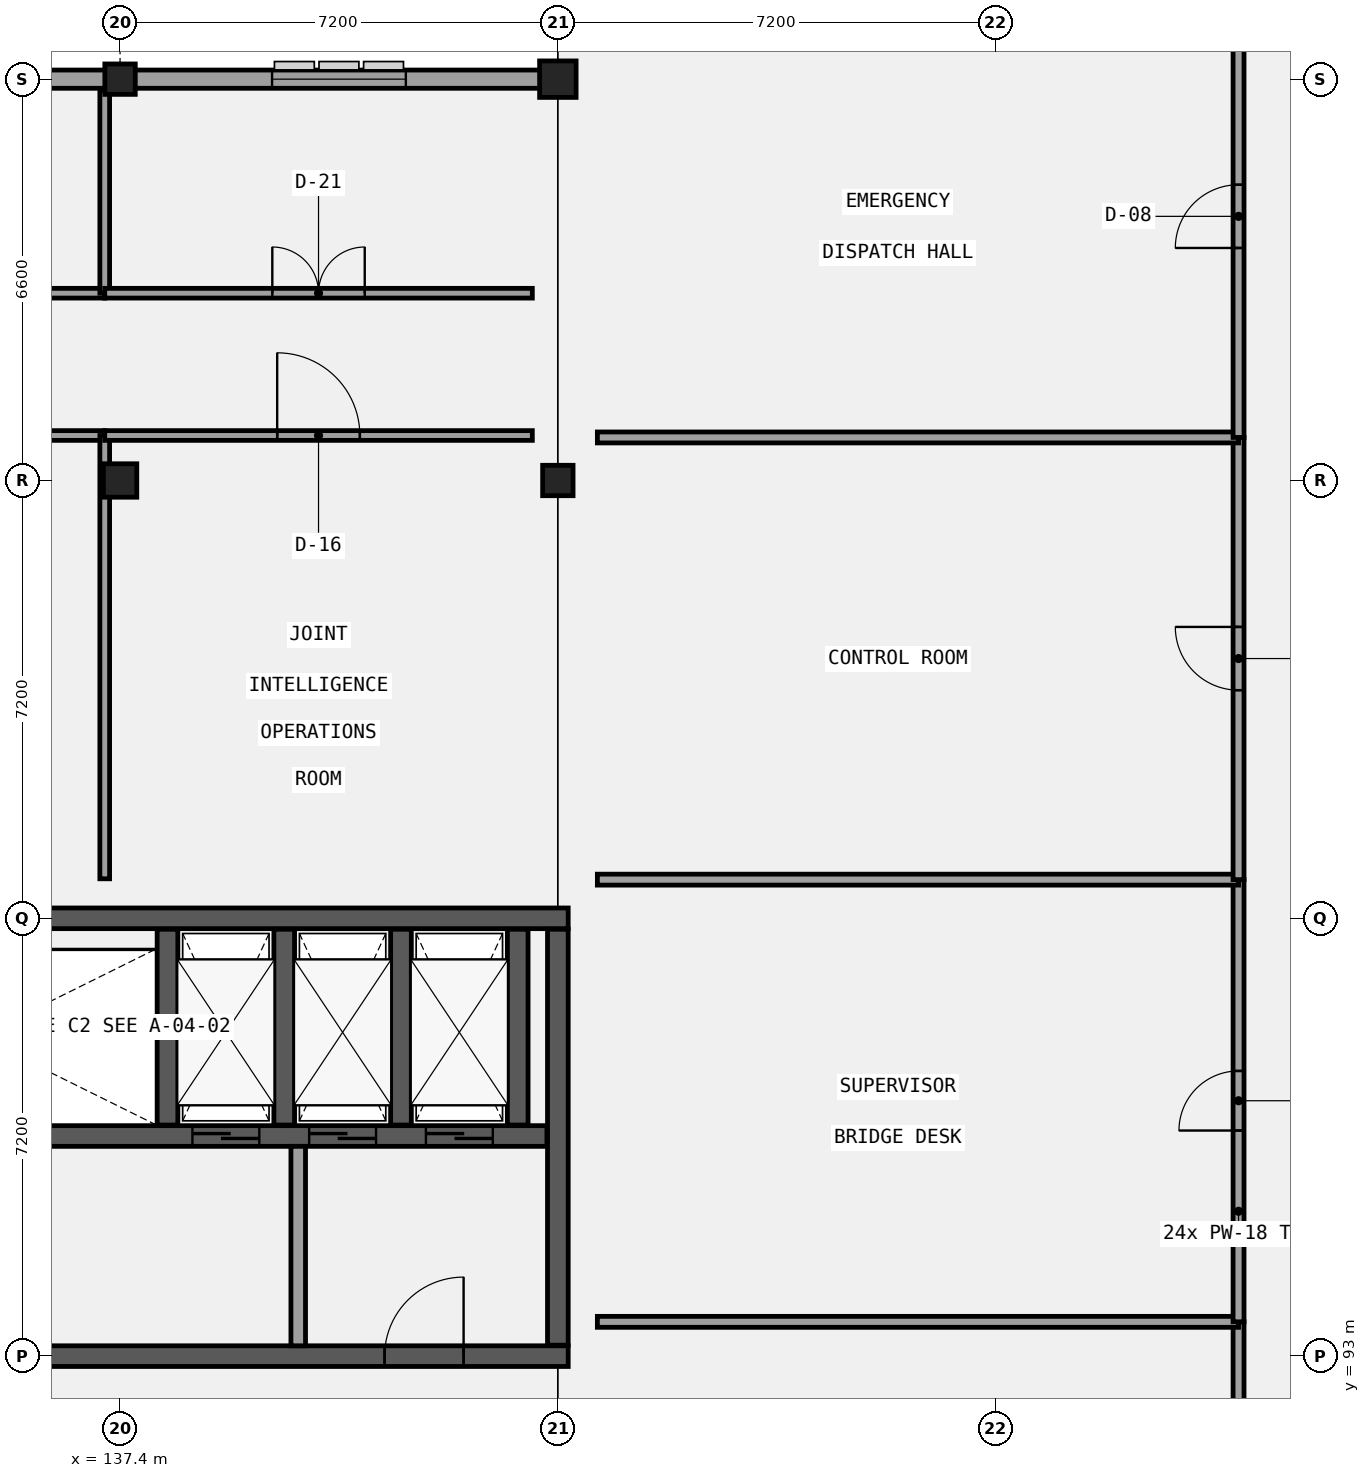
"""IFC4 building model, lengths in metres.
Left out: names, types, materials, properties, quantities, classifications, styles, units other than length and angle.
Written with IfcOpenShell. Run it as: python <this file> out.ifc"""

import sys

from ifc_helpers import new_model, si_unit, direction, frame, frame_2d, origin, origin_2d, place, context, subcontext, project, spatial, rectangle, extrude, element, fill, save


model = new_model("IFC4")
c1 = context("Model", 3, precision=1e-05, world=origin(), true_north=direction((0.0, 1.0)))
c2 = subcontext(c1, "Body", "Model", "MODEL_VIEW")
j1 = project(units=[si_unit("LENGTHUNIT", "METRE"), si_unit("PLANEANGLEUNIT", "RADIAN")], contexts=[c1])
p1 = place(None, origin())
s1 = spatial("IfcSite", under=j1, at=p1, CompositionType="ELEMENT")
p2 = place(p1, origin())
s2 = spatial("IfcBuilding", under=s1, at=p2, CompositionType="ELEMENT")
p3 = place(p2, frame((0.0, 0.0, 26.4)))
s3 = spatial("IfcBuildingStorey", under=s2, at=p3, CompositionType="ELEMENT", Elevation=26.4)
p4 = place(p3, frame((130.03, 100.2, 0.0), z_axis=(0.0, 0.0, 1.0), x_axis=(1.0, 0.0, 0.0)))
e1 = element("IfcWall", 1, at=p4, inside=s3, PredefinedType="SHEAR", context=c2, shape_type="SweptSolid", body=[
    extrude(rectangle(XDim=14.74, YDim=0.34, at=frame_2d((7.37, 0.0))), origin(), (0.0, 0.0, 1.0), 4.5),
])
p5 = place(p3, frame((130.03, 93.0, 0.0), z_axis=(0.0, 0.0, 1.0), x_axis=(1.0, 0.0, 0.0)))
e2 = element("IfcWall", 2, at=p5, inside=s3, PredefinedType="SHEAR", context=c2, shape_type="SweptSolid", body=[
    extrude(rectangle(XDim=14.74, YDim=0.34, at=frame_2d((7.37, 0.0))), origin(), (0.0, 0.0, 1.0), 4.5),
])
p6 = place(p5, frame((3.72, 0.0, 0.0)))
e3 = element("IfcOpeningElement", 3, at=p6, cuts=e2, PredefinedType="OPENING", context=c2, shape_type="SweptSolid", body=[
    extrude(rectangle(XDim=1.3, YDim=2.2, at=frame_2d((0.65, 1.1))), frame((0.0, 0.18, 0.0), z_axis=(0.0, -1.0, 0.0), x_axis=(1.0, 0.0, 0.0)), (0.0, 0.0, 1.0), 0.36),
])
p7 = place(p5, frame((11.72, 0.0, 0.0)))
e4 = element("IfcOpeningElement", 4, at=p7, cuts=e2, PredefinedType="OPENING", context=c2, shape_type="SweptSolid", body=[
    extrude(rectangle(XDim=1.3, YDim=2.2, at=frame_2d((0.65, 1.1))), frame((0.0, 0.18, 0.0), z_axis=(0.0, -1.0, 0.0), x_axis=(1.0, 0.0, 0.0)), (0.0, 0.0, 1.0), 0.36),
])
p8 = place(p3, frame((144.6, 93.18, 0.0), z_axis=(0.0, 0.0, 1.0), x_axis=(0.0, 1.0, 0.0)))
e5 = element("IfcWall", 5, at=p8, inside=s3, PredefinedType="SHEAR", context=c2, shape_type="SweptSolid", body=[
    extrude(rectangle(XDim=6.84, YDim=0.34, at=frame_2d((3.42, 0.0))), origin(), (0.0, 0.0, 1.0), 4.5),
])
p9 = place(p3, frame((130.38, 96.62, 0.0), z_axis=(0.0, 0.0, 1.0), x_axis=(1.0, 0.0, 0.0)))
e6 = element("IfcWall", 6, at=p9, inside=s3, PredefinedType="SHEAR", context=c2, shape_type="SweptSolid", body=[
    extrude(rectangle(XDim=14.04, YDim=0.34, at=frame_2d((7.02, 0.0))), origin(), (0.0, 0.0, 1.0), 4.5),
])
p10 = place(p9, frame((8.21, 0.0, 0.0)))
e7 = element("IfcOpeningElement", 7, at=p10, cuts=e6, PredefinedType="OPENING", context=c2, shape_type="SweptSolid", body=[
    extrude(rectangle(XDim=1.1, YDim=2.15, at=frame_2d((0.55, 1.075))), frame((0.0, 0.18, 0.0), z_axis=(0.0, -1.0, 0.0), x_axis=(1.0, 0.0, 0.0)), (0.0, 0.0, 1.0), 0.36),
])
p11 = place(p9, frame((10.13, 0.0, 0.0)))
e8 = element("IfcOpeningElement", 8, at=p11, cuts=e6, PredefinedType="OPENING", context=c2, shape_type="SweptSolid", body=[
    extrude(rectangle(XDim=1.1, YDim=2.15, at=frame_2d((0.55, 1.075))), frame((0.0, 0.18, 0.0), z_axis=(0.0, -1.0, 0.0), x_axis=(1.0, 0.0, 0.0)), (0.0, 0.0, 1.0), 0.36),
])
p12 = place(p9, frame((12.05, 0.0, 0.0)))
e9 = element("IfcOpeningElement", 9, at=p12, cuts=e6, PredefinedType="OPENING", context=c2, shape_type="SweptSolid", body=[
    extrude(rectangle(XDim=1.1, YDim=2.15, at=frame_2d((0.55, 1.075))), frame((0.0, 0.18, 0.0), z_axis=(0.0, -1.0, 0.0), x_axis=(1.0, 0.0, 0.0)), (0.0, 0.0, 1.0), 0.36),
])
p13 = place(p9, frame((0.395, 0.0, 0.0)))
e10 = element("IfcOpeningElement", 10, at=p13, cuts=e6, PredefinedType="OPENING", context=c2, shape_type="SweptSolid", body=[
    extrude(rectangle(XDim=1.15, YDim=2.15, at=frame_2d((0.575, 1.075))), frame((0.0, 0.18, 0.0), z_axis=(0.0, -1.0, 0.0), x_axis=(1.0, 0.0, 0.0)), (0.0, 0.0, 1.0), 0.36),
])
for number, where, z_axis, x_axis in (
    (11, (138.18, 96.8, 0.0), (0.0, 0.0, 1.0), (0.0, 1.0, 0.0)),
    (12, (140.1, 96.8, 0.0), (0.0, 0.0, 1.0), (0.0, 1.0, 0.0)),
    (13, (142.02, 96.8, 0.0), (0.0, 0.0, 1.0), (0.0, 1.0, 0.0)),
    (14, (143.94, 96.8, 0.0), (0.0, 0.0, 1.0), (0.0, 1.0, 0.0)),
):
    element("IfcWall", number, at=place(p3, frame(where, z_axis=z_axis, x_axis=x_axis)), inside=s3, PredefinedType="SHEAR", context=c2, shape_type="SweptSolid", body=[
        extrude(rectangle(XDim=3.22, YDim=0.34, at=frame_2d((1.61, 0.0))), origin(), (0.0, 0.0, 1.0), 4.5),
    ])
p14 = place(p3, frame((137.4, 107.4, 0.0), z_axis=(0.0, 0.0, 1.0), x_axis=(1.0, 0.0, 0.0)))
e15 = element("IfcColumn", 15, at=p14, inside=s3, PredefinedType="COLUMN", context=c2, shape_type="SweptSolid", body=[
    extrude(rectangle(XDim=0.55, YDim=0.55, at=origin_2d()), origin(), (0.0, 0.0, 1.0), 4.5),
])
for number, where, z_axis, x_axis in (
    (16, (137.4, 114.0, 0.0), (0.0, 0.0, 1.0), (1.0, 0.0, 0.0)),
    (17, (144.6, 107.4, 0.0), (0.0, 0.0, 1.0), (1.0, 0.0, 0.0)),
):
    element("IfcColumn", number, at=place(p3, frame(where, z_axis=z_axis, x_axis=x_axis)), inside=s3, PredefinedType="COLUMN", context=c2, shape_type="SweptSolid", body=[
        extrude(rectangle(XDim=0.5, YDim=0.5, at=origin_2d()), origin(), (0.0, 0.0, 1.0), 4.5),
    ])
p15 = place(p3, frame((144.6, 114.0, 0.0), z_axis=(0.0, 0.0, 1.0), x_axis=(1.0, 0.0, 0.0)))
e18 = element("IfcColumn", 18, at=p15, inside=s3, PredefinedType="COLUMN", context=c2, shape_type="SweptSolid", body=[
    extrude(rectangle(XDim=0.6, YDim=0.6, at=origin_2d()), origin(), (0.0, 0.0, 1.0), 4.5),
])
p16 = place(p3, frame((140.33, 93.17, 0.0), z_axis=(0.0, 0.0, 1.0), x_axis=(0.0, 1.0, 0.0)))
e19 = element("IfcWall", 19, at=p16, inside=s3, PredefinedType="SOLIDWALL", context=c2, shape_type="SweptSolid", body=[
    extrude(rectangle(XDim=3.28, YDim=0.24, at=frame_2d((1.64, 0.0))), origin(), (0.0, 0.0, 1.0), 4.19),
])
p17 = place(p3, frame((144.75, 114.0, 0.0), z_axis=(0.0, 0.0, 1.0), x_axis=(-1.0, 0.0, 0.0)))
e20 = element("IfcWall", 20, at=p17, inside=s3, PredefinedType="SOLIDWALL", context=c2, shape_type="SweptSolid", body=[
    extrude(rectangle(XDim=36.3, YDim=0.3, at=frame_2d((18.15, 0.0))), origin(), (0.0, 0.0, 1.0), 3.47),
])
p18 = place(p17, frame((31.55, 0.0, 0.95)))
e21 = element("IfcOpeningElement", 21, at=p18, cuts=e20, PredefinedType="OPENING", context=c2, shape_type="SweptSolid", body=[
    extrude(rectangle(XDim=2.0, YDim=1.9, at=frame_2d((1.0, 0.95))), frame((0.0, 0.16, 0.0), z_axis=(0.0, -1.0, 0.0), x_axis=(1.0, 0.0, 0.0)), (0.0, 0.0, 1.0), 0.32),
])
p19 = place(p17, frame((24.35, 0.0, 0.95)))
e22 = element("IfcOpeningElement", 22, at=p19, cuts=e20, PredefinedType="OPENING", context=c2, shape_type="SweptSolid", body=[
    extrude(rectangle(XDim=2.0, YDim=2.15, at=frame_2d((1.0, 1.075))), frame((0.0, 0.16, 0.0), z_axis=(0.0, -1.0, 0.0), x_axis=(1.0, 0.0, 0.0)), (0.0, 0.0, 1.0), 0.32),
])
p20 = place(p17, frame((17.05, 0.0, 0.95)))
e23 = element("IfcOpeningElement", 23, at=p20, cuts=e20, PredefinedType="OPENING", context=c2, shape_type="SweptSolid", body=[
    extrude(rectangle(XDim=2.2, YDim=1.4, at=frame_2d((1.1, 0.7))), frame((0.0, 0.16, 0.0), z_axis=(0.0, -1.0, 0.0), x_axis=(1.0, 0.0, 0.0)), (0.0, 0.0, 1.0), 0.32),
])
p21 = place(p17, frame((9.85, 0.0, 0.95)))
e24 = element("IfcOpeningElement", 24, at=p21, cuts=e20, PredefinedType="OPENING", context=c2, shape_type="SweptSolid", body=[
    extrude(rectangle(XDim=2.2, YDim=1.65, at=frame_2d((1.1, 0.825))), frame((0.0, 0.16, 0.0), z_axis=(0.0, -1.0, 0.0), x_axis=(1.0, 0.0, 0.0)), (0.0, 0.0, 1.0), 0.32),
])
p22 = place(p17, frame((2.65, 0.0, 0.95)))
e25 = element("IfcOpeningElement", 25, at=p22, cuts=e20, PredefinedType="OPENING", context=c2, shape_type="SweptSolid", body=[
    extrude(rectangle(XDim=2.2, YDim=1.9, at=frame_2d((1.1, 0.95))), frame((0.0, 0.16, 0.0), z_axis=(0.0, -1.0, 0.0), x_axis=(1.0, 0.0, 0.0)), (0.0, 0.0, 1.0), 0.32),
])
p23 = place(p3, frame((130.116, 108.14, 0.0), z_axis=(0.0, 0.0, 1.0), x_axis=(1.0, 0.0, 0.0)))
e26 = element("IfcWall", 26, at=p23, inside=s3, PredefinedType="PARTITIONING", context=c2, shape_type="SweptSolid", body=[
    extrude(rectangle(XDim=7.032, YDim=0.16, at=frame_2d((3.516, 0.0))), origin(), (0.0, 0.0, 1.0), 4.22),
])
p24 = place(p23, frame((2.906, 0.0, 0.0)))
e27 = element("IfcOpeningElement", 27, at=p24, cuts=e26, PredefinedType="OPENING", context=c2, shape_type="SweptSolid", body=[
    extrude(rectangle(XDim=1.22, YDim=2.35, at=frame_2d((0.61, 1.175))), frame((0.0, 0.09, 0.0), z_axis=(0.0, -1.0, 0.0), x_axis=(1.0, 0.0, 0.0)), (0.0, 0.0, 1.0), 0.18),
])
p25 = place(p3, frame((137.148, 100.85, 0.0), z_axis=(0.0, 0.0, 1.0), x_axis=(0.0, 1.0, 0.0)))
e28 = element("IfcWall", 28, at=p25, inside=s3, PredefinedType="PARTITIONING", context=c2, shape_type="SweptSolid", body=[
    extrude(rectangle(XDim=7.29, YDim=0.16, at=frame_2d((3.645, 0.0))), origin(), (0.0, 0.0, 1.0), 3.22),
])
p26 = place(p3, frame((137.148, 108.14, 0.0), z_axis=(0.0, 0.0, 1.0), x_axis=(1.0, 0.0, 0.0)))
e29 = element("IfcWall", 29, at=p26, inside=s3, PredefinedType="PARTITIONING", context=c2, shape_type="SweptSolid", body=[
    extrude(rectangle(XDim=7.032, YDim=0.16, at=frame_2d((3.516, 0.0))), origin(), (0.0, 0.0, 1.0), 4.22),
])
p27 = place(p26, frame((2.836, 0.0, 0.0)))
e30 = element("IfcOpeningElement", 30, at=p27, cuts=e29, PredefinedType="OPENING", context=c2, shape_type="SweptSolid", body=[
    extrude(rectangle(XDim=1.36, YDim=2.1, at=frame_2d((0.68, 1.05))), frame((0.0, 0.09, 0.0), z_axis=(0.0, -1.0, 0.0), x_axis=(1.0, 0.0, 0.0)), (0.0, 0.0, 1.0), 0.18),
])
p28 = place(p3, frame((130.116, 110.48, 0.0), z_axis=(0.0, 0.0, 1.0), x_axis=(1.0, 0.0, 0.0)))
e31 = element("IfcWall", 31, at=p28, inside=s3, PredefinedType="PARTITIONING", context=c2, shape_type="SweptSolid", body=[
    extrude(rectangle(XDim=7.032, YDim=0.16, at=frame_2d((3.516, 0.0))), origin(), (0.0, 0.0, 1.0), 3.67),
])
p29 = place(p28, frame((2.756, 0.0, 0.0)))
e32 = element("IfcOpeningElement", 32, at=p29, cuts=e31, PredefinedType="OPENING", context=c2, shape_type="SweptSolid", body=[
    extrude(rectangle(XDim=1.52, YDim=2.22, at=frame_2d((0.76, 1.11))), frame((0.0, 0.09, 0.0), z_axis=(0.0, -1.0, 0.0), x_axis=(1.0, 0.0, 0.0)), (0.0, 0.0, 1.0), 0.18),
])
p30 = place(p3, frame((137.148, 110.48, 0.0), z_axis=(0.0, 0.0, 1.0), x_axis=(0.0, 1.0, 0.0)))
e33 = element("IfcWall", 33, at=p30, inside=s3, PredefinedType="PARTITIONING", context=c2, shape_type="SweptSolid", body=[
    extrude(rectangle(XDim=3.34, YDim=0.16, at=frame_2d((1.67, 0.0))), origin(), (0.0, 0.0, 1.0), 3.67),
])
p31 = place(p3, frame((137.148, 110.48, 0.0), z_axis=(0.0, 0.0, 1.0), x_axis=(1.0, 0.0, 0.0)))
e34 = element("IfcWall", 34, at=p31, inside=s3, PredefinedType="PARTITIONING", context=c2, shape_type="SweptSolid", body=[
    extrude(rectangle(XDim=7.032, YDim=0.16, at=frame_2d((3.516, 0.0))), origin(), (0.0, 0.0, 1.0), 3.67),
])
p32 = place(p31, frame((2.756, 0.0, 0.0)))
e35 = element("IfcOpeningElement", 35, at=p32, cuts=e34, PredefinedType="OPENING", context=c2, shape_type="SweptSolid", body=[
    extrude(rectangle(XDim=1.52, YDim=2.35, at=frame_2d((0.76, 1.175))), frame((0.0, 0.09, 0.0), z_axis=(0.0, -1.0, 0.0), x_axis=(1.0, 0.0, 0.0)), (0.0, 0.0, 1.0), 0.18),
])
p33 = place(p3, frame((155.795, 86.292, 0.0), z_axis=(0.0, 0.0, 1.0), x_axis=(0.0, 1.0, 0.0)))
e36 = element("IfcWall", 36, at=p33, inside=s3, PredefinedType="PARTITIONING", context=c2, shape_type="SweptSolid", body=[
    extrude(rectangle(XDim=7.272, YDim=0.18, at=frame_2d((3.636, 0.0))), origin(), (0.0, 0.0, 1.0), 4.22),
])
p34 = place(p33, frame((3.146, 0.0, 0.0)))
e37 = element("IfcOpeningElement", 37, at=p34, cuts=e36, PredefinedType="OPENING", context=c2, shape_type="SweptSolid", body=[
    extrude(rectangle(XDim=0.98, YDim=2.22, at=frame_2d((0.49, 1.11))), frame((0.0, 0.1, 0.0), z_axis=(0.0, -1.0, 0.0), x_axis=(1.0, 0.0, 0.0)), (0.0, 0.0, 1.0), 0.2),
])
p35 = place(p3, frame((145.25, 93.564, 0.0), z_axis=(0.0, 0.0, 1.0), x_axis=(1.0, 0.0, 0.0)))
e38 = element("IfcWall", 38, at=p35, inside=s3, PredefinedType="PARTITIONING", context=c2, shape_type="SweptSolid", body=[
    extrude(rectangle(XDim=10.545, YDim=0.18, at=frame_2d((5.272, 0.0))), origin(), (0.0, 0.0, 1.0), 4.22),
])
p36 = place(p3, frame((155.795, 93.564, 0.0), z_axis=(0.0, 0.0, 1.0), x_axis=(0.0, 1.0, 0.0)))
e39 = element("IfcWall", 39, at=p36, inside=s3, PredefinedType="PARTITIONING", context=c2, shape_type="SweptSolid", body=[
    extrude(rectangle(XDim=7.272, YDim=0.18, at=frame_2d((3.636, 0.0))), origin(), (0.0, 0.0, 1.0), 4.22),
])
p37 = place(p36, frame((3.146, 0.0, 0.0)))
e40 = element("IfcOpeningElement", 40, at=p37, cuts=e39, PredefinedType="OPENING", context=c2, shape_type="SweptSolid", body=[
    extrude(rectangle(XDim=0.98, YDim=2.35, at=frame_2d((0.49, 1.175))), frame((0.0, 0.1, 0.0), z_axis=(0.0, -1.0, 0.0), x_axis=(1.0, 0.0, 0.0)), (0.0, 0.0, 1.0), 0.2),
])
p38 = place(p3, frame((145.25, 100.836, 0.0), z_axis=(0.0, 0.0, 1.0), x_axis=(1.0, 0.0, 0.0)))
e41 = element("IfcWall", 41, at=p38, inside=s3, PredefinedType="PARTITIONING", context=c2, shape_type="SweptSolid", body=[
    extrude(rectangle(XDim=10.545, YDim=0.18, at=frame_2d((5.272, 0.0))), origin(), (0.0, 0.0, 1.0), 4.22),
])
p39 = place(p3, frame((155.795, 100.836, 0.0), z_axis=(0.0, 0.0, 1.0), x_axis=(0.0, 1.0, 0.0)))
e42 = element("IfcWall", 42, at=p39, inside=s3, PredefinedType="PARTITIONING", context=c2, shape_type="SweptSolid", body=[
    extrude(rectangle(XDim=7.272, YDim=0.18, at=frame_2d((3.636, 0.0))), origin(), (0.0, 0.0, 1.0), 4.22),
])
p40 = place(p39, frame((3.116, 0.0, 0.0)))
e43 = element("IfcOpeningElement", 43, at=p40, cuts=e42, PredefinedType="OPENING", context=c2, shape_type="SweptSolid", body=[
    extrude(rectangle(XDim=1.04, YDim=2.1, at=frame_2d((0.52, 1.05))), frame((0.0, 0.1, 0.0), z_axis=(0.0, -1.0, 0.0), x_axis=(1.0, 0.0, 0.0)), (0.0, 0.0, 1.0), 0.2),
])
p41 = place(p3, frame((145.25, 108.108, 0.0), z_axis=(0.0, 0.0, 1.0), x_axis=(1.0, 0.0, 0.0)))
e44 = element("IfcWall", 44, at=p41, inside=s3, PredefinedType="PARTITIONING", context=c2, shape_type="SweptSolid", body=[
    extrude(rectangle(XDim=10.545, YDim=0.18, at=frame_2d((5.272, 0.0))), origin(), (0.0, 0.0, 1.0), 4.22),
])
p42 = place(p3, frame((155.795, 108.108, 0.0), z_axis=(0.0, 0.0, 1.0), x_axis=(0.0, 1.0, 0.0)))
e45 = element("IfcWall", 45, at=p42, inside=s3, PredefinedType="PARTITIONING", context=c2, shape_type="SweptSolid", body=[
    extrude(rectangle(XDim=7.272, YDim=0.18, at=frame_2d((3.636, 0.0))), origin(), (0.0, 0.0, 1.0), 4.22),
])
p43 = place(p42, frame((3.116, 0.0, 0.0)))
e46 = element("IfcOpeningElement", 46, at=p43, cuts=e45, PredefinedType="OPENING", context=c2, shape_type="SweptSolid", body=[
    extrude(rectangle(XDim=1.04, YDim=2.22, at=frame_2d((0.52, 1.11))), frame((0.0, 0.1, 0.0), z_axis=(0.0, -1.0, 0.0), x_axis=(1.0, 0.0, 0.0)), (0.0, 0.0, 1.0), 0.2),
])
p44 = place(p10, frame((1.1, 0.0, 0.0), z_axis=(0.0, 0.0, 1.0), x_axis=(-1.0, 0.0, 0.0)))
e47 = element("IfcDoor", 47, at=p44, inside=s3, OperationType="DOUBLE_DOOR_SLIDING", PredefinedType="DOOR", context=c2, shape_type="SweptSolid", body=[
    extrude(rectangle(XDim=1.1, YDim=2.15, at=frame_2d((0.55, 1.075))), frame((0.0, 0.025, 0.0), z_axis=(0.0, -1.0, 0.0), x_axis=(1.0, 0.0, 0.0)), (0.0, 0.0, 1.0), 0.05),
])
fill(e7, e47)
p45 = place(p11, frame((1.1, 0.0, 0.0), z_axis=(0.0, 0.0, 1.0), x_axis=(-1.0, 0.0, 0.0)))
e48 = element("IfcDoor", 48, at=p45, inside=s3, OperationType="DOUBLE_DOOR_SLIDING", PredefinedType="DOOR", context=c2, shape_type="SweptSolid", body=[
    extrude(rectangle(XDim=1.1, YDim=2.15, at=frame_2d((0.55, 1.075))), frame((0.0, 0.025, 0.0), z_axis=(0.0, -1.0, 0.0), x_axis=(1.0, 0.0, 0.0)), (0.0, 0.0, 1.0), 0.05),
])
fill(e8, e48)
p46 = place(p12, frame((1.1, 0.0, 0.0), z_axis=(0.0, 0.0, 1.0), x_axis=(-1.0, 0.0, 0.0)))
e49 = element("IfcDoor", 49, at=p46, inside=s3, OperationType="DOUBLE_DOOR_SLIDING", PredefinedType="DOOR", context=c2, shape_type="SweptSolid", body=[
    extrude(rectangle(XDim=1.1, YDim=2.15, at=frame_2d((0.55, 1.075))), frame((0.0, 0.025, 0.0), z_axis=(0.0, -1.0, 0.0), x_axis=(1.0, 0.0, 0.0)), (0.0, 0.0, 1.0), 0.05),
])
fill(e9, e49)
p47 = place(p7, frame((1.3, 0.0, 0.0), z_axis=(0.0, 0.0, 1.0), x_axis=(-1.0, 0.0, 0.0)))
e50 = element("IfcDoor", 50, at=p47, inside=s3, OperationType="SINGLE_SWING_RIGHT", PredefinedType="DOOR", context=c2, shape_type="SweptSolid", body=[
    extrude(rectangle(XDim=1.3, YDim=2.2, at=frame_2d((0.65, 1.1))), frame((0.0, 0.025, 0.0), z_axis=(0.0, -1.0, 0.0), x_axis=(1.0, 0.0, 0.0)), (0.0, 0.0, 1.0), 0.05),
])
fill(e4, e50)
p48 = place(p22, origin())
e51 = element("IfcWindow", 51, at=p48, inside=s3, PartitioningType="SINGLE_PANEL", PredefinedType="WINDOW", context=c2, shape_type="SweptSolid", body=[
    extrude(rectangle(XDim=2.2, YDim=1.9, at=frame_2d((1.1, 0.95))), frame((0.0, 0.03, 0.0), z_axis=(0.0, -1.0, 0.0), x_axis=(1.0, 0.0, 0.0)), (0.0, 0.0, 1.0), 0.06),
])
fill(e25, e51)
p49 = place(p27, frame((1.36, 0.0, 0.0), z_axis=(0.0, 0.0, 1.0), x_axis=(-1.0, 0.0, 0.0)))
e52 = element("IfcDoor", 52, at=p49, inside=s3, OperationType="SINGLE_SWING_LEFT", PredefinedType="DOOR", context=c2, shape_type="SweptSolid", body=[
    extrude(rectangle(XDim=1.36, YDim=2.1, at=frame_2d((0.68, 1.05))), frame((0.0, 0.025, 0.0), z_axis=(0.0, -1.0, 0.0), x_axis=(1.0, 0.0, 0.0)), (0.0, 0.0, 1.0), 0.05),
])
fill(e30, e52)
p50 = place(p32, origin())
e53 = element("IfcDoor", 53, at=p50, inside=s3, OperationType="DOUBLE_DOOR_SINGLE_SWING", PredefinedType="DOOR", context=c2, shape_type="SweptSolid", body=[
    extrude(rectangle(XDim=1.52, YDim=2.35, at=frame_2d((0.76, 1.175))), frame((0.0, 0.025, 0.0), z_axis=(0.0, -1.0, 0.0), x_axis=(1.0, 0.0, 0.0)), (0.0, 0.0, 1.0), 0.05),
])
fill(e35, e53)
p51 = place(p37, frame((0.98, 0.0, 0.0), z_axis=(0.0, 0.0, 1.0), x_axis=(-1.0, 0.0, 0.0)))
e54 = element("IfcDoor", 54, at=p51, inside=s3, OperationType="SINGLE_SWING_LEFT", PredefinedType="DOOR", context=c2, shape_type="SweptSolid", body=[
    extrude(rectangle(XDim=0.98, YDim=2.35, at=frame_2d((0.49, 1.175))), frame((0.0, 0.025, 0.0), z_axis=(0.0, -1.0, 0.0), x_axis=(1.0, 0.0, 0.0)), (0.0, 0.0, 1.0), 0.05),
])
fill(e40, e54)
p52 = place(p40, frame((1.04, 0.0, 0.0), z_axis=(0.0, 0.0, 1.0), x_axis=(-1.0, 0.0, 0.0)))
e55 = element("IfcDoor", 55, at=p52, inside=s3, OperationType="SINGLE_SWING_RIGHT", PredefinedType="DOOR", context=c2, shape_type="SweptSolid", body=[
    extrude(rectangle(XDim=1.04, YDim=2.1, at=frame_2d((0.52, 1.05))), frame((0.0, 0.025, 0.0), z_axis=(0.0, -1.0, 0.0), x_axis=(1.0, 0.0, 0.0)), (0.0, 0.0, 1.0), 0.05),
])
fill(e43, e55)
p53 = place(p43, frame((1.04, 0.0, 0.0), z_axis=(0.0, 0.0, 1.0), x_axis=(-1.0, 0.0, 0.0)))
e56 = element("IfcDoor", 56, at=p53, inside=s3, OperationType="SINGLE_SWING_LEFT", PredefinedType="DOOR", context=c2, shape_type="SweptSolid", body=[
    extrude(rectangle(XDim=1.04, YDim=2.22, at=frame_2d((0.52, 1.11))), frame((0.0, 0.025, 0.0), z_axis=(0.0, -1.0, 0.0), x_axis=(1.0, 0.0, 0.0)), (0.0, 0.0, 1.0), 0.05),
])
fill(e46, e56)
save(model, sys.argv[1])
